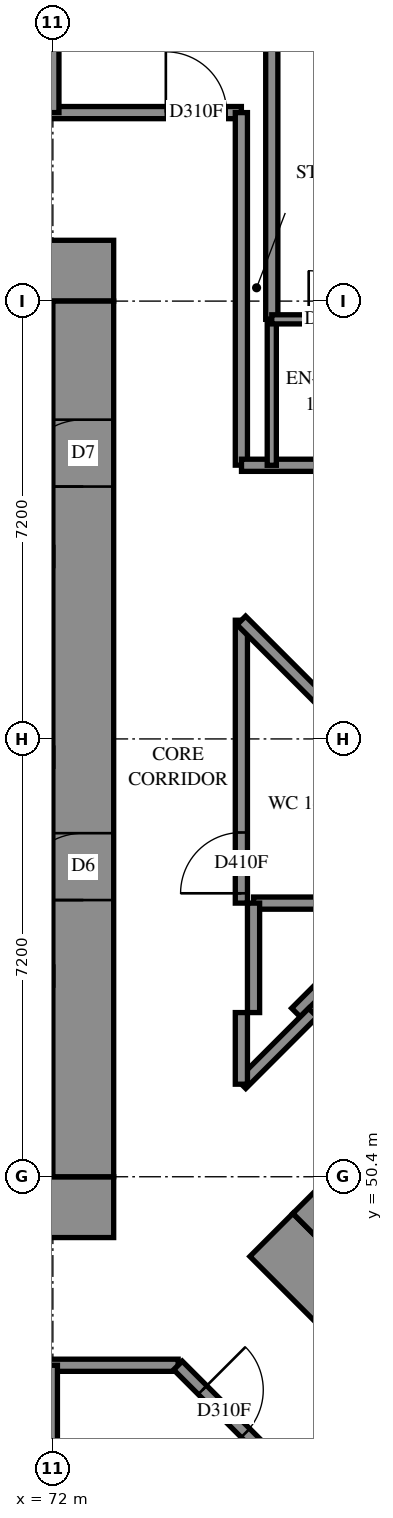
"""IFC4 building model, lengths in metres.
Left out: names, types, materials, properties, quantities, classifications, styles, units other than length and angle.
Written with IfcOpenShell. Run it as: python <this file> out.ifc"""

import sys

from ifc_helpers import new_model, si_unit, direction, frame, frame_2d, origin, place, context, subcontext, project, spatial, rectangle, extrude, element, fill, save


model = new_model("IFC4")
c1 = context("Model", 3, precision=1e-05, world=origin(), true_north=direction((0.0, 1.0)))
c2 = subcontext(c1, "Body", "Model", "MODEL_VIEW")
j1 = project(units=[si_unit("LENGTHUNIT", "METRE"), si_unit("PLANEANGLEUNIT", "RADIAN")], contexts=[c1])
p1 = place(None, origin())
s1 = spatial("IfcSite", under=j1, at=p1, CompositionType="ELEMENT")
p2 = place(p1, origin())
s2 = spatial("IfcBuilding", under=s1, at=p2, CompositionType="ELEMENT")
p3 = place(p2, frame((0.0, 0.0, 54.2)))
s3 = spatial("IfcBuildingStorey", under=s2, at=p3, CompositionType="ELEMENT", Elevation=54.2)
p4 = place(p3, frame((56.6, 49.9, -0.3), z_axis=(0.0, 0.0, 1.0), x_axis=(1.0, 0.0, 0.0)))
e1 = element("IfcWall", 1, at=p4, inside=s3, PredefinedType="SHEAR", context=c2, shape_type="SweptSolid", body=[
    extrude(rectangle(XDim=16.4, YDim=1.0, at=frame_2d((8.2, 0.0))), origin(), (0.0, 0.0, 1.0), 2.7),
])
p5 = place(p3, frame((56.6, 65.3, -0.3), z_axis=(0.0, 0.0, 1.0), x_axis=(1.0, 0.0, 0.0)))
e2 = element("IfcWall", 2, at=p5, inside=s3, PredefinedType="SHEAR", context=c2, shape_type="SweptSolid", body=[
    extrude(rectangle(XDim=16.4, YDim=1.0, at=frame_2d((8.2, 0.0))), origin(), (0.0, 0.0, 1.0), 2.7),
])
p6 = place(p5, frame((11.0, 0.0, 0.3)))
e3 = element("IfcOpeningElement", 3, at=p6, cuts=e2, PredefinedType="OPENING", context=c2, shape_type="SweptSolid", body=[
    extrude(rectangle(XDim=0.8, YDim=2.1, at=frame_2d((0.4, 1.05))), frame((0.0, 0.51, 0.0), z_axis=(0.0, -1.0, 0.0), x_axis=(1.0, 0.0, 0.0)), (0.0, 0.0, 1.0), 1.02),
])
p7 = place(p3, frame((72.5, 50.4, -0.3), z_axis=(0.0, 0.0, 1.0), x_axis=(0.0, 1.0, 0.0)))
e4 = element("IfcWall", 4, at=p7, inside=s3, PredefinedType="SHEAR", context=c2, shape_type="SweptSolid", body=[
    extrude(rectangle(XDim=14.4, YDim=1.0, at=frame_2d((7.2, 0.0))), origin(), (0.0, 0.0, 1.0), 2.7),
])
p8 = place(p7, frame((4.55, 0.0, 0.3)))
e5 = element("IfcOpeningElement", 5, at=p8, cuts=e4, PredefinedType="OPENING", context=c2, shape_type="SweptSolid", body=[
    extrude(rectangle(XDim=1.1, YDim=2.1, at=frame_2d((0.55, 1.05))), frame((0.0, 0.51, 0.0), z_axis=(0.0, -1.0, 0.0), x_axis=(1.0, 0.0, 0.0)), (0.0, 0.0, 1.0), 1.02),
])
p9 = place(p7, frame((11.35, 0.0, 0.3)))
e6 = element("IfcOpeningElement", 6, at=p9, cuts=e4, PredefinedType="OPENING", context=c2, shape_type="SweptSolid", body=[
    extrude(rectangle(XDim=1.1, YDim=2.1, at=frame_2d((0.55, 1.05))), frame((0.0, 0.51, 0.0), z_axis=(0.0, -1.0, 0.0), x_axis=(1.0, 0.0, 0.0)), (0.0, 0.0, 1.0), 1.02),
])
p10 = place(p3, frame((75.594, 49.443, -0.3), z_axis=(0.0, 0.0, 1.0), x_axis=(0.7071037324, -0.70710983, 0.0)))
e7 = element("IfcWall", 7, at=p10, inside=s3, PredefinedType="SHEAR", context=c2, shape_type="SweptSolid", body=[
    extrude(rectangle(XDim=16.4, YDim=1.0, at=frame_2d((8.2, 0.0))), origin(), (0.0, 0.0, 1.0), 2.7),
])
p11 = place(p3, frame((76.301, 49.443, -0.3), z_axis=(0.0, 0.0, 1.0), x_axis=(0.7071067812, 0.7071067812, 0.0)))
e8 = element("IfcWall", 8, at=p11, inside=s3, PredefinedType="SHEAR", context=c2, shape_type="SweptSolid", body=[
    extrude(rectangle(XDim=14.4, YDim=1.0, at=frame_2d((7.2, 0.0))), origin(), (0.0, 0.0, 1.0), 2.7),
])
p12 = place(p11, frame((4.55, 0.0, 0.3)))
e9 = element("IfcOpeningElement", 9, at=p12, cuts=e8, PredefinedType="OPENING", context=c2, shape_type="SweptSolid", body=[
    extrude(rectangle(XDim=1.1, YDim=2.1, at=frame_2d((0.55, 1.05))), frame((0.0, 0.51, 0.0), z_axis=(0.0, -1.0, 0.0), x_axis=(1.0, 0.0, 0.0)), (0.0, 0.0, 1.0), 1.02),
])
p13 = place(p11, frame((11.35, 0.0, 0.3)))
e10 = element("IfcOpeningElement", 10, at=p13, cuts=e8, PredefinedType="OPENING", context=c2, shape_type="SweptSolid", body=[
    extrude(rectangle(XDim=1.1, YDim=2.1, at=frame_2d((0.55, 1.05))), frame((0.0, 0.51, 0.0), z_axis=(0.0, -1.0, 0.0), x_axis=(1.0, 0.0, 0.0)), (0.0, 0.0, 1.0), 1.02),
])
p14 = place(p3, frame((54.5, 67.9, 0.0), z_axis=(0.0, 0.0, 1.0), x_axis=(1.0, 0.0, 0.0)))
e11 = element("IfcWall", 11, at=p14, inside=s3, PredefinedType="PARTITIONING", context=c2, shape_type="SweptSolid", body=[
    extrude(rectangle(XDim=20.6, YDim=0.2, at=frame_2d((10.3, 0.0))), origin(), (0.0, 0.0, 1.0), 3.1),
])
p15 = place(p14, frame((0.198, 0.0, 0.0)))
e12 = element("IfcOpeningElement", 12, at=p15, cuts=e11, PredefinedType="OPENING", context=c2, shape_type="SweptSolid", body=[
    extrude(rectangle(XDim=1.0, YDim=2.1, at=frame_2d((0.5, 1.05))), frame((0.0, 0.11, 0.0), z_axis=(0.0, -1.0, 0.0), x_axis=(1.0, 0.0, 0.0)), (0.0, 0.0, 1.0), 0.22),
])
p16 = place(p14, frame((19.358, 0.0, 0.0)))
e13 = element("IfcOpeningElement", 13, at=p16, cuts=e11, PredefinedType="OPENING", context=c2, shape_type="SweptSolid", body=[
    extrude(rectangle(XDim=1.0, YDim=2.1, at=frame_2d((0.5, 1.05))), frame((0.0, 0.11, 0.0), z_axis=(0.0, -1.0, 0.0), x_axis=(1.0, 0.0, 0.0)), (0.0, 0.0, 1.0), 0.22),
])
p17 = place(p14, frame((6.698, 0.0, 0.0)))
e14 = element("IfcOpeningElement", 14, at=p17, cuts=e11, PredefinedType="OPENING", context=c2, shape_type="SweptSolid", body=[
    extrude(rectangle(XDim=0.9, YDim=2.1, at=frame_2d((0.45, 1.05))), frame((0.0, 0.11, 0.0), z_axis=(0.0, -1.0, 0.0), x_axis=(1.0, 0.0, 0.0)), (0.0, 0.0, 1.0), 0.22),
])
p18 = place(p14, frame((13.884, 0.0, 0.0)))
e15 = element("IfcOpeningElement", 15, at=p18, cuts=e11, PredefinedType="OPENING", context=c2, shape_type="SweptSolid", body=[
    extrude(rectangle(XDim=1.0, YDim=2.1, at=frame_2d((0.5, 1.05))), frame((0.0, 0.11, 0.0), z_axis=(0.0, -1.0, 0.0), x_axis=(1.0, 0.0, 0.0)), (0.0, 0.0, 1.0), 0.22),
])
p19 = place(p3, frame((54.5, 47.3, 0.0), z_axis=(0.0, 0.0, 1.0), x_axis=(1.0, 0.0, 0.0)))
e16 = element("IfcWall", 16, at=p19, inside=s3, PredefinedType="PARTITIONING", context=c2, shape_type="SweptSolid", body=[
    extrude(rectangle(XDim=19.56, YDim=0.2, at=frame_2d((9.78, 0.0))), origin(), (0.0, 0.0, 1.0), 3.1),
])
p20 = place(p19, frame((0.23, 0.0, 0.0)))
e17 = element("IfcOpeningElement", 17, at=p20, cuts=e16, PredefinedType="OPENING", context=c2, shape_type="SweptSolid", body=[
    extrude(rectangle(XDim=1.0, YDim=2.1, at=frame_2d((0.5, 1.05))), frame((0.0, 0.11, 0.0), z_axis=(0.0, -1.0, 0.0), x_axis=(1.0, 0.0, 0.0)), (0.0, 0.0, 1.0), 0.22),
])
p21 = place(p19, frame((5.4, 0.0, 0.0)))
e18 = element("IfcOpeningElement", 18, at=p21, cuts=e16, PredefinedType="OPENING", context=c2, shape_type="SweptSolid", body=[
    extrude(rectangle(XDim=0.9, YDim=2.1, at=frame_2d((0.45, 1.05))), frame((0.0, 0.11, 0.0), z_axis=(0.0, -1.0, 0.0), x_axis=(1.0, 0.0, 0.0)), (0.0, 0.0, 1.0), 0.22),
])
p22 = place(p19, frame((9.001, 0.0, 0.0)))
e19 = element("IfcOpeningElement", 19, at=p22, cuts=e16, PredefinedType="OPENING", context=c2, shape_type="SweptSolid", body=[
    extrude(rectangle(XDim=0.9, YDim=2.1, at=frame_2d((0.45, 1.05))), frame((0.0, 0.11, 0.0), z_axis=(0.0, -1.0, 0.0), x_axis=(1.0, 0.0, 0.0)), (0.0, 0.0, 1.0), 0.22),
])
p23 = place(p19, frame((14.3, 0.0, 0.0)))
e20 = element("IfcOpeningElement", 20, at=p23, cuts=e16, PredefinedType="OPENING", context=c2, shape_type="SweptSolid", body=[
    extrude(rectangle(XDim=0.9, YDim=2.1, at=frame_2d((0.45, 1.05))), frame((0.0, 0.11, 0.0), z_axis=(0.0, -1.0, 0.0), x_axis=(1.0, 0.0, 0.0)), (0.0, 0.0, 1.0), 0.22),
])
p24 = place(p3, frame((75.6, 64.5, 0.0), z_axis=(0.0, 0.0, 1.0), x_axis=(0.0, 1.0, 0.0)))
e21 = element("IfcWall", 21, at=p24, inside=s3, PredefinedType="PARTITIONING", context=c2, shape_type="SweptSolid", body=[
    extrude(rectangle(XDim=8.253, YDim=0.2, at=frame_2d((4.127, 0.0))), origin(), (0.0, 0.0, 1.0), 3.1),
])
p25 = place(p3, frame((75.1, 62.102, 0.0), z_axis=(0.0, 0.0, 1.0), x_axis=(0.0, 1.0, 0.0)))
e22 = element("IfcWall", 22, at=p25, inside=s3, PredefinedType="PARTITIONING", context=c2, shape_type="SweptSolid", body=[
    extrude(rectangle(XDim=5.798, YDim=0.2, at=frame_2d((2.899, 0.0))), origin(), (0.0, 0.0, 1.0), 3.1),
])
p26 = place(p3, frame((74.057, 47.297, 0.0), z_axis=(0.0, 0.0, 1.0), x_axis=(0.7071067812, -0.7071067812, 0.0)))
e23 = element("IfcWall", 23, at=p26, inside=s3, PredefinedType="PARTITIONING", context=c2, shape_type="SweptSolid", body=[
    extrude(rectangle(XDim=4.653, YDim=0.2, at=frame_2d((2.326, 0.0))), origin(), (0.0, 0.0, 1.0), 3.1),
])
p27 = place(p26, frame((0.57, 0.0, 0.0)))
e24 = element("IfcOpeningElement", 24, at=p27, cuts=e23, PredefinedType="OPENING", context=c2, shape_type="SweptSolid", body=[
    extrude(rectangle(XDim=1.0, YDim=2.1, at=frame_2d((0.5, 1.05))), frame((0.0, 0.11, 0.0), z_axis=(0.0, -1.0, 0.0), x_axis=(1.0, 0.0, 0.0)), (0.0, 0.0, 1.0), 0.22),
])
p28 = place(p3, frame((75.1, 54.9, 0.0), z_axis=(0.0, 0.0, 1.0), x_axis=(0.0, 1.0, 0.0)))
e25 = element("IfcWall", 25, at=p28, inside=s3, PredefinedType="PARTITIONING", context=c2, shape_type="SweptSolid", body=[
    extrude(rectangle(XDim=4.652, YDim=0.2, at=frame_2d((2.326, 0.0))), origin(), (0.0, 0.0, 1.0), 3.1),
])
p29 = place(p28, frame((0.161, 0.0, 0.0)))
e26 = element("IfcOpeningElement", 26, at=p29, cuts=e25, PredefinedType="OPENING", context=c2, shape_type="SweptSolid", body=[
    extrude(rectangle(XDim=1.0, YDim=2.1, at=frame_2d((0.5, 1.05))), frame((0.0, 0.11, 0.0), z_axis=(0.0, -1.0, 0.0), x_axis=(1.0, 0.0, 0.0)), (0.0, 0.0, 1.0), 0.22),
])
p30 = place(p3, frame((75.102, 62.1, 0.0), z_axis=(0.0, 0.0, 1.0), x_axis=(1.0, 0.0, 0.0)))
e27 = element("IfcWall", 27, at=p30, inside=s3, PredefinedType="PARTITIONING", context=c2, shape_type="SweptSolid", body=[
    extrude(rectangle(XDim=4.098, YDim=0.2, at=frame_2d((2.049, 0.0))), origin(), (0.0, 0.0, 1.0), 3.1),
])
p31 = place(p30, frame((2.848, 0.0, 0.0)))
e28 = element("IfcOpeningElement", 28, at=p31, cuts=e27, PredefinedType="OPENING", context=c2, shape_type="SweptSolid", body=[
    extrude(rectangle(XDim=0.9, YDim=2.1, at=frame_2d((0.45, 1.05))), frame((0.0, 0.11, 0.0), z_axis=(0.0, -1.0, 0.0), x_axis=(1.0, 0.0, 0.0)), (0.0, 0.0, 1.0), 0.22),
])
p32 = place(p3, frame((72.0, 67.9, 0.0), z_axis=(0.0, 0.0, 1.0), x_axis=(0.0, 1.0, 0.0)))
e29 = element("IfcWall", 29, at=p32, inside=s3, PredefinedType="PARTITIONING", context=c2, shape_type="SweptSolid", body=[
    extrude(rectangle(XDim=3.5, YDim=0.2, at=frame_2d((1.75, 0.0))), origin(), (0.0, 0.0, 1.0), 3.1),
])
p33 = place(p3, frame((75.099, 59.549, 0.0), z_axis=(0.0, 0.0, 1.0), x_axis=(0.7071067812, -0.7071067812, 0.0)))
e30 = element("IfcWall", 30, at=p33, inside=s3, PredefinedType="PARTITIONING", context=c2, shape_type="SweptSolid", body=[
    extrude(rectangle(XDim=3.179, YDim=0.2, at=frame_2d((1.59, 0.0))), origin(), (0.0, 0.0, 1.0), 3.1),
])
p34 = place(p3, frame((75.997, 53.101, 0.0), z_axis=(0.0, 0.0, 1.0), x_axis=(0.7071067812, 0.7071067812, 0.0)))
e31 = element("IfcWall", 31, at=p34, inside=s3, PredefinedType="PARTITIONING", context=c2, shape_type="SweptSolid", body=[
    extrude(rectangle(XDim=2.546, YDim=0.2, at=frame_2d((1.273, 0.0))), origin(), (0.0, 0.0, 1.0), 3.1),
])
p35 = place(p3, frame((75.3, 54.9, 0.0), z_axis=(0.0, 0.0, 1.0), x_axis=(1.0, 0.0, 0.0)))
e32 = element("IfcWall", 32, at=p35, inside=s3, PredefinedType="PARTITIONING", context=c2, shape_type="SweptSolid", body=[
    extrude(rectangle(XDim=2.498, YDim=0.2, at=frame_2d((1.249, 0.0))), origin(), (0.0, 0.0, 1.0), 3.1),
])
for number, where, z_axis, x_axis in (
    (33, (72.0, 44.9, 0.0), (0.0, 0.0, 1.0), (0.0, 1.0, 0.0)),
    (34, (75.6, 62.1, 0.0), (0.0, 0.0, 1.0), (0.0, 1.0, 0.0)),
):
    element("IfcWall", number, at=place(p3, frame(where, z_axis=z_axis, x_axis=x_axis)), inside=s3, PredefinedType="PARTITIONING", context=c2, shape_type="SweptSolid", body=[
        extrude(rectangle(XDim=2.4, YDim=0.15, at=frame_2d((1.2, 0.0))), origin(), (0.0, 0.0, 1.0), 3.1),
    ])
p36 = place(p3, frame((75.6, 64.5, 0.0), z_axis=(0.0, 0.0, 1.0), x_axis=(1.0, 0.0, 0.0)))
e35 = element("IfcWall", 35, at=p36, inside=s3, PredefinedType="PARTITIONING", context=c2, shape_type="SweptSolid", body=[
    extrude(rectangle(XDim=1.9, YDim=0.15, at=frame_2d((0.95, 0.0))), origin(), (0.0, 0.0, 1.0), 3.1),
])
p37 = place(p36, frame((0.607, 0.0, 0.0)))
e36 = element("IfcOpeningElement", 36, at=p37, cuts=e35, PredefinedType="OPENING", context=c2, shape_type="SweptSolid", body=[
    extrude(rectangle(XDim=0.8, YDim=2.1, at=frame_2d((0.4, 1.05))), frame((0.0, 0.085, 0.0), z_axis=(0.0, -1.0, 0.0), x_axis=(1.0, 0.0, 0.0)), (0.0, 0.0, 1.0), 0.17),
])
p38 = place(p3, frame((75.3, 53.1, 0.0), z_axis=(0.0, 0.0, 1.0), x_axis=(0.0, 1.0, 0.0)))
e37 = element("IfcWall", 37, at=p38, inside=s3, PredefinedType="PARTITIONING", context=c2, shape_type="SweptSolid", body=[
    extrude(rectangle(XDim=1.8, YDim=0.2, at=frame_2d((0.9, 0.0))), origin(), (0.0, 0.0, 1.0), 3.1),
])
p39 = place(p3, frame((75.102, 51.922, 0.0), z_axis=(0.0, 0.0, 1.0), x_axis=(0.7071067812, 0.7071067812, 0.0)))
e38 = element("IfcWall", 38, at=p39, inside=s3, PredefinedType="PARTITIONING", context=c2, shape_type="SweptSolid", body=[
    extrude(rectangle(XDim=1.663, YDim=0.2, at=frame_2d((0.832, 0.0))), origin(), (0.0, 0.0, 1.0), 3.1),
])
p40 = place(p3, frame((75.1, 51.922, 0.0), z_axis=(0.0, 0.0, 1.0), x_axis=(0.0, 1.0, 0.0)))
e39 = element("IfcWall", 39, at=p40, inside=s3, PredefinedType="PARTITIONING", context=c2, shape_type="SweptSolid", body=[
    extrude(rectangle(XDim=1.178, YDim=0.2, at=frame_2d((0.589, 0.0))), origin(), (0.0, 0.0, 1.0), 3.1),
])
p41 = place(p8, origin())
e40 = element("IfcDoor", 40, at=p41, inside=s3, OperationType="DOUBLE_DOOR_SINGLE_SWING", PredefinedType="DOOR", context=c2, shape_type="SweptSolid", body=[
    extrude(rectangle(XDim=1.1, YDim=2.1, at=frame_2d((0.55, 1.05))), frame((0.0, 0.025, 0.0), z_axis=(0.0, -1.0, 0.0), x_axis=(1.0, 0.0, 0.0)), (0.0, 0.0, 1.0), 0.05),
])
fill(e5, e40)
p42 = place(p9, origin())
e41 = element("IfcDoor", 41, at=p42, inside=s3, OperationType="SINGLE_SWING_RIGHT", PredefinedType="DOOR", context=c2, shape_type="SweptSolid", body=[
    extrude(rectangle(XDim=1.1, YDim=2.1, at=frame_2d((0.55, 1.05))), frame((0.0, 0.025, 0.0), z_axis=(0.0, -1.0, 0.0), x_axis=(1.0, 0.0, 0.0)), (0.0, 0.0, 1.0), 0.05),
])
fill(e6, e41)
p43 = place(p29, origin())
e42 = element("IfcDoor", 42, at=p43, inside=s3, OperationType="SINGLE_SWING_LEFT", PredefinedType="DOOR", context=c2, shape_type="SweptSolid", body=[
    extrude(rectangle(XDim=1.0, YDim=2.1, at=frame_2d((0.5, 1.05))), frame((0.0, 0.025, 0.0), z_axis=(0.0, -1.0, 0.0), x_axis=(1.0, 0.0, 0.0)), (0.0, 0.0, 1.0), 0.05),
])
fill(e26, e42)
p44 = place(p16, origin())
e43 = element("IfcDoor", 43, at=p44, inside=s3, OperationType="SINGLE_SWING_RIGHT", PredefinedType="DOOR", context=c2, shape_type="SweptSolid", body=[
    extrude(rectangle(XDim=1.0, YDim=2.1, at=frame_2d((0.5, 1.05))), frame((0.0, 0.025, 0.0), z_axis=(0.0, -1.0, 0.0), x_axis=(1.0, 0.0, 0.0)), (0.0, 0.0, 1.0), 0.05),
])
fill(e13, e43)
p45 = place(p37, origin())
e44 = element("IfcDoor", 44, at=p45, inside=s3, OperationType="SINGLE_SWING_RIGHT", PredefinedType="DOOR", context=c2, shape_type="SweptSolid", body=[
    extrude(rectangle(XDim=0.8, YDim=2.1, at=frame_2d((0.4, 1.05))), frame((0.0, 0.025, 0.0), z_axis=(0.0, -1.0, 0.0), x_axis=(1.0, 0.0, 0.0)), (0.0, 0.0, 1.0), 0.05),
])
fill(e36, e44)
p46 = place(p27, origin())
e45 = element("IfcDoor", 45, at=p46, inside=s3, OperationType="SINGLE_SWING_LEFT", PredefinedType="DOOR", context=c2, shape_type="SweptSolid", body=[
    extrude(rectangle(XDim=1.0, YDim=2.1, at=frame_2d((0.5, 1.05))), frame((0.0, 0.025, 0.0), z_axis=(0.0, -1.0, 0.0), x_axis=(1.0, 0.0, 0.0)), (0.0, 0.0, 1.0), 0.05),
])
fill(e24, e45)
save(model, sys.argv[1])
